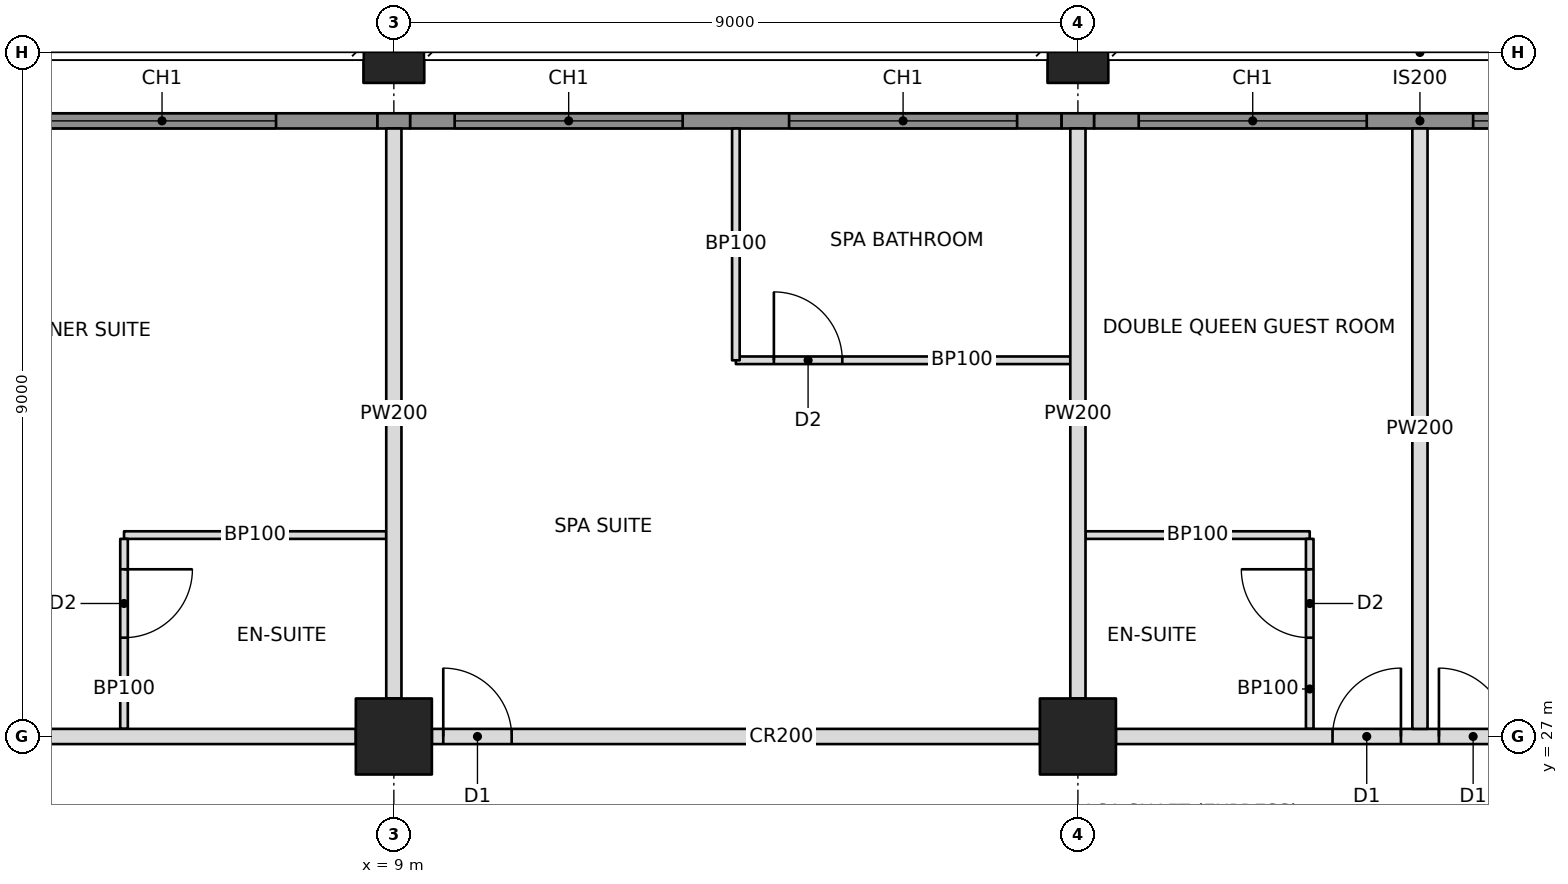
"""IFC4 building model, lengths in metres.
Left out: names, types, materials, properties, quantities, classifications, styles, units other than length and angle.
Written with IfcOpenShell. Run it as: python <this file> out.ifc"""

import sys

from ifc_helpers import new_model, si_unit, direction, frame, frame_2d, origin, origin_2d, place, context, subcontext, project, spatial, rectangle, hollow_rectangle, extrude, element, fill, save


model = new_model("IFC4")
c1 = context("Model", 3, precision=1e-05, world=origin(), true_north=direction((0.0, 1.0)))
c2 = subcontext(c1, "Body", "Model", "MODEL_VIEW")
j1 = project(units=[si_unit("LENGTHUNIT", "METRE"), si_unit("PLANEANGLEUNIT", "RADIAN")], contexts=[c1])
p1 = place(None, origin())
s1 = spatial("IfcSite", under=j1, at=p1, CompositionType="ELEMENT")
p2 = place(p1, origin())
s2 = spatial("IfcBuilding", under=s1, at=p2, CompositionType="ELEMENT")
p3 = place(p2, frame((0.0, 0.0, 152.0)))
s3 = spatial("IfcBuildingStorey", under=s2, at=p3, CompositionType="ELEMENT", Elevation=152.0)
p4 = place(p3, frame((9.0, 27.0, 0.0), z_axis=(0.0, 0.0, 1.0), x_axis=(1.0, 0.0, 0.0)))
e1 = element("IfcColumn", 1, at=p4, inside=s3, PredefinedType="COLUMN", context=c2, shape_type="SweptSolid", body=[
    extrude(hollow_rectangle(XDim=1.0, YDim=1.0, WallThickness=0.1, at=origin_2d()), origin(), (0.0, 0.0, 1.0), 3.4),
])
p5 = place(p3, frame((9.0, 36.0, 0.0), z_axis=(0.0, 0.0, 1.0), x_axis=(1.0, 0.0, 0.0)))
e2 = element("IfcColumn", 2, at=p5, inside=s3, PredefinedType="COLUMN", context=c2, shape_type="SweptSolid", body=[
    extrude(hollow_rectangle(XDim=0.8, YDim=0.8, WallThickness=0.06, at=origin_2d()), origin(), (0.0, 0.0, 1.0), 3.4),
])
p6 = place(p3, frame((18.0, 27.0, 0.0), z_axis=(0.0, 0.0, 1.0), x_axis=(1.0, 0.0, 0.0)))
e3 = element("IfcColumn", 3, at=p6, inside=s3, PredefinedType="COLUMN", context=c2, shape_type="SweptSolid", body=[
    extrude(hollow_rectangle(XDim=1.0, YDim=1.0, WallThickness=0.1, at=origin_2d()), origin(), (0.0, 0.0, 1.0), 3.4),
])
p7 = place(p3, frame((18.0, 36.0, 0.0), z_axis=(0.0, 0.0, 1.0), x_axis=(1.0, 0.0, 0.0)))
e4 = element("IfcColumn", 4, at=p7, inside=s3, PredefinedType="COLUMN", context=c2, shape_type="SweptSolid", body=[
    extrude(hollow_rectangle(XDim=0.8, YDim=0.8, WallThickness=0.06, at=origin_2d()), origin(), (0.0, 0.0, 1.0), 3.4),
])
p8 = place(p3, frame((3.0, 35.1, 0.0), z_axis=(0.0, 0.0, 1.0), x_axis=(1.0, 0.0, 0.0)))
e5 = element("IfcWall", 5, at=p8, inside=s3, PredefinedType="SOLIDWALL", context=c2, shape_type="SweptSolid", body=[
    extrude(rectangle(XDim=5.785, YDim=0.2, at=frame_2d((2.892, 0.0))), origin(), (0.0, 0.0, 1.0), 3.15),
])
p9 = place(p8, frame((1.45, 0.0, 0.6)))
e6 = element("IfcOpeningElement", 6, at=p9, cuts=e5, PredefinedType="OPENING", context=c2, shape_type="SweptSolid", body=[
    extrude(rectangle(XDim=3.0, YDim=2.2, at=frame_2d((1.5, 1.1))), frame((0.0, 0.11, 0.0), z_axis=(0.0, -1.0, 0.0), x_axis=(1.0, 0.0, 0.0)), (0.0, 0.0, 1.0), 0.22),
])
p10 = place(p3, frame((1.0, 27.0, 0.0), z_axis=(0.0, 0.0, 1.0), x_axis=(1.0, 0.0, 0.0)))
e7 = element("IfcWall", 7, at=p10, inside=s3, PredefinedType="PARTITIONING", context=c2, shape_type="SweptSolid", body=[
    extrude(rectangle(XDim=7.5, YDim=0.2, at=frame_2d((3.75, 0.0))), origin(), (0.0, 0.0, 1.0), 2.21),
])
p11 = place(p10, frame((0.25, 0.0, 0.0)))
e8 = element("IfcOpeningElement", 8, at=p11, cuts=e7, PredefinedType="OPENING", context=c2, shape_type="SweptSolid", body=[
    extrude(rectangle(XDim=0.9, YDim=2.1, at=frame_2d((0.45, 1.05))), frame((0.0, 0.11, 0.0), z_axis=(0.0, -1.0, 0.0), x_axis=(1.0, 0.0, 0.0)), (0.0, 0.0, 1.0), 0.22),
])
p12 = place(p3, frame((9.5, 27.0, 0.0), z_axis=(0.0, 0.0, 1.0), x_axis=(1.0, 0.0, 0.0)))
e9 = element("IfcWall", 9, at=p12, inside=s3, PredefinedType="PARTITIONING", context=c2, shape_type="SweptSolid", body=[
    extrude(rectangle(XDim=8.0, YDim=0.2, at=frame_2d((4.0, 0.0))), origin(), (0.0, 0.0, 1.0), 2.21),
])
p13 = place(p12, frame((0.15, 0.0, 0.0)))
e10 = element("IfcOpeningElement", 10, at=p13, cuts=e9, PredefinedType="OPENING", context=c2, shape_type="SweptSolid", body=[
    extrude(rectangle(XDim=0.9, YDim=2.1, at=frame_2d((0.45, 1.05))), frame((0.0, 0.11, 0.0), z_axis=(0.0, -1.0, 0.0), x_axis=(1.0, 0.0, 0.0)), (0.0, 0.0, 1.0), 0.22),
])
p14 = place(p3, frame((18.5, 27.0, 0.0), z_axis=(0.0, 0.0, 1.0), x_axis=(1.0, 0.0, 0.0)))
e11 = element("IfcWall", 11, at=p14, inside=s3, PredefinedType="PARTITIONING", context=c2, shape_type="SweptSolid", body=[
    extrude(rectangle(XDim=8.0, YDim=0.2, at=frame_2d((4.0, 0.0))), origin(), (0.0, 0.0, 1.0), 2.21),
])
p15 = place(p14, frame((2.85, 0.0, 0.0)))
e12 = element("IfcOpeningElement", 12, at=p15, cuts=e11, PredefinedType="OPENING", context=c2, shape_type="SweptSolid", body=[
    extrude(rectangle(XDim=0.9, YDim=2.1, at=frame_2d((0.45, 1.05))), frame((0.0, 0.11, 0.0), z_axis=(0.0, -1.0, 0.0), x_axis=(1.0, 0.0, 0.0)), (0.0, 0.0, 1.0), 0.22),
])
p16 = place(p14, frame((4.25, 0.0, 0.0)))
e13 = element("IfcOpeningElement", 13, at=p16, cuts=e11, PredefinedType="OPENING", context=c2, shape_type="SweptSolid", body=[
    extrude(rectangle(XDim=0.9, YDim=2.1, at=frame_2d((0.45, 1.05))), frame((0.0, 0.11, 0.0), z_axis=(0.0, -1.0, 0.0), x_axis=(1.0, 0.0, 0.0)), (0.0, 0.0, 1.0), 0.22),
])
p17 = place(p3, frame((9.0, 27.5, 0.0), z_axis=(0.0, 0.0, 1.0), x_axis=(0.0, 1.0, 0.0)))
e14 = element("IfcWall", 14, at=p17, inside=s3, PredefinedType="PARTITIONING", context=c2, shape_type="SweptSolid", body=[
    extrude(rectangle(XDim=7.5, YDim=0.2, at=frame_2d((3.75, 0.0))), origin(), (0.0, 0.0, 1.0), 2.21),
])
p18 = place(p3, frame((18.0, 27.5, 0.0), z_axis=(0.0, 0.0, 1.0), x_axis=(0.0, 1.0, 0.0)))
e15 = element("IfcWall", 15, at=p18, inside=s3, PredefinedType="PARTITIONING", context=c2, shape_type="SweptSolid", body=[
    extrude(rectangle(XDim=7.5, YDim=0.2, at=frame_2d((3.75, 0.0))), origin(), (0.0, 0.0, 1.0), 2.203),
])
p19 = place(p3, frame((22.5, 27.1, 0.0), z_axis=(0.0, 0.0, 1.0), x_axis=(0.0, 1.0, 0.0)))
e16 = element("IfcWall", 16, at=p19, inside=s3, PredefinedType="PARTITIONING", context=c2, shape_type="SweptSolid", body=[
    extrude(rectangle(XDim=7.9, YDim=0.2, at=frame_2d((3.95, 0.0))), origin(), (0.0, 0.0, 1.0), 2.21),
])
p20 = place(p3, frame((5.45, 29.65, 0.0), z_axis=(0.0, 0.0, 1.0), x_axis=(1.0, 0.0, 0.0)))
e17 = element("IfcWall", 17, at=p20, inside=s3, PredefinedType="PARTITIONING", context=c2, shape_type="SweptSolid", body=[
    extrude(rectangle(XDim=3.45, YDim=0.1, at=frame_2d((1.725, 0.0))), origin(), (0.0, 0.0, 1.0), 2.21),
])
p21 = place(p3, frame((5.45, 27.1, 0.0), z_axis=(0.0, 0.0, 1.0), x_axis=(0.0, 1.0, 0.0)))
e18 = element("IfcWall", 18, at=p21, inside=s3, PredefinedType="PARTITIONING", context=c2, shape_type="SweptSolid", body=[
    extrude(rectangle(XDim=2.5, YDim=0.1, at=frame_2d((1.25, 0.0))), origin(), (0.0, 0.0, 1.0), 2.21),
])
p22 = place(p21, frame((1.2, 0.0, 0.0)))
e19 = element("IfcOpeningElement", 19, at=p22, cuts=e18, PredefinedType="OPENING", context=c2, shape_type="SweptSolid", body=[
    extrude(rectangle(XDim=0.9, YDim=2.1, at=frame_2d((0.45, 1.05))), frame((0.0, 0.06, 0.0), z_axis=(0.0, -1.0, 0.0), x_axis=(1.0, 0.0, 0.0)), (0.0, 0.0, 1.0), 0.12),
])
p23 = place(p3, frame((13.5, 31.95, 0.0), z_axis=(0.0, 0.0, 1.0), x_axis=(1.0, 0.0, 0.0)))
e20 = element("IfcWall", 20, at=p23, inside=s3, PredefinedType="PARTITIONING", context=c2, shape_type="SweptSolid", body=[
    extrude(rectangle(XDim=4.4, YDim=0.1, at=frame_2d((2.2, 0.0))), origin(), (0.0, 0.0, 1.0), 2.202),
])
p24 = place(p23, frame((0.5, 0.0, 0.0)))
e21 = element("IfcOpeningElement", 21, at=p24, cuts=e20, PredefinedType="OPENING", context=c2, shape_type="SweptSolid", body=[
    extrude(rectangle(XDim=0.9, YDim=2.1, at=frame_2d((0.45, 1.05))), frame((0.0, 0.06, 0.0), z_axis=(0.0, -1.0, 0.0), x_axis=(1.0, 0.0, 0.0)), (0.0, 0.0, 1.0), 0.12),
])
p25 = place(p3, frame((13.5, 31.95, 0.0), z_axis=(0.0, 0.0, 1.0), x_axis=(0.0, 1.0, 0.0)))
e22 = element("IfcWall", 22, at=p25, inside=s3, PredefinedType="PARTITIONING", context=c2, shape_type="SweptSolid", body=[
    extrude(rectangle(XDim=3.05, YDim=0.1, at=frame_2d((1.525, 0.0))), origin(), (0.0, 0.0, 1.0), 2.542),
])
p26 = place(p3, frame((18.1, 29.65, 0.0), z_axis=(0.0, 0.0, 1.0), x_axis=(1.0, 0.0, 0.0)))
e23 = element("IfcWall", 23, at=p26, inside=s3, PredefinedType="PARTITIONING", context=c2, shape_type="SweptSolid", body=[
    extrude(rectangle(XDim=2.95, YDim=0.1, at=frame_2d((1.475, 0.0))), origin(), (0.0, 0.0, 1.0), 2.202),
])
p27 = place(p3, frame((21.05, 27.1, 0.0), z_axis=(0.0, 0.0, 1.0), x_axis=(0.0, 1.0, 0.0)))
e24 = element("IfcWall", 24, at=p27, inside=s3, PredefinedType="PARTITIONING", context=c2, shape_type="SweptSolid", body=[
    extrude(rectangle(XDim=2.5, YDim=0.1, at=frame_2d((1.25, 0.0))), origin(), (0.0, 0.0, 1.0), 2.21),
])
p28 = place(p27, frame((1.2, 0.0, 0.0)))
e25 = element("IfcOpeningElement", 25, at=p28, cuts=e24, PredefinedType="OPENING", context=c2, shape_type="SweptSolid", body=[
    extrude(rectangle(XDim=0.9, YDim=2.1, at=frame_2d((0.45, 1.05))), frame((0.0, 0.06, 0.0), z_axis=(0.0, -1.0, 0.0), x_axis=(1.0, 0.0, 0.0)), (0.0, 0.0, 1.0), 0.12),
])
p29 = place(p3, frame((8.785, 35.1, 0.0), z_axis=(0.0, 0.0, 1.0), x_axis=(1.0, 0.0, 0.0)))
e26 = element("IfcWall", 26, at=p29, inside=s3, PredefinedType="SOLIDWALL", context=c2, shape_type="SweptSolid", body=[
    extrude(rectangle(XDim=0.431, YDim=0.2, at=frame_2d((0.215, 0.0))), origin(), (0.0, 0.0, 1.0), 2.21),
])
p30 = place(p3, frame((9.215, 35.1, 0.0), z_axis=(0.0, 0.0, 1.0), x_axis=(1.0, 0.0, 0.0)))
e27 = element("IfcWall", 27, at=p30, inside=s3, PredefinedType="SOLIDWALL", context=c2, shape_type="SweptSolid", body=[
    extrude(rectangle(XDim=8.571, YDim=0.2, at=frame_2d((4.285, 0.0))), origin(), (0.0, 0.0, 1.0), 3.15),
])
p31 = place(p30, frame((0.585, 0.0, 0.6)))
e28 = element("IfcOpeningElement", 28, at=p31, cuts=e27, PredefinedType="OPENING", context=c2, shape_type="SweptSolid", body=[
    extrude(rectangle(XDim=3.0, YDim=2.2, at=frame_2d((1.5, 1.1))), frame((0.0, 0.11, 0.0), z_axis=(0.0, -1.0, 0.0), x_axis=(1.0, 0.0, 0.0)), (0.0, 0.0, 1.0), 0.22),
])
p32 = place(p30, frame((4.985, 0.0, 0.6)))
e29 = element("IfcOpeningElement", 29, at=p32, cuts=e27, PredefinedType="OPENING", context=c2, shape_type="SweptSolid", body=[
    extrude(rectangle(XDim=3.0, YDim=2.2, at=frame_2d((1.5, 1.1))), frame((0.0, 0.11, 0.0), z_axis=(0.0, -1.0, 0.0), x_axis=(1.0, 0.0, 0.0)), (0.0, 0.0, 1.0), 0.22),
])
p33 = place(p3, frame((17.786, 35.1, 0.0), z_axis=(0.0, 0.0, 1.0), x_axis=(1.0, 0.0, 0.0)))
e30 = element("IfcWall", 30, at=p33, inside=s3, PredefinedType="SOLIDWALL", context=c2, shape_type="SweptSolid", body=[
    extrude(rectangle(XDim=0.428, YDim=0.2, at=frame_2d((0.214, 0.0))), origin(), (0.0, 0.0, 1.0), 2.202),
])
p34 = place(p3, frame((18.214, 35.1, 0.0), z_axis=(0.0, 0.0, 1.0), x_axis=(1.0, 0.0, 0.0)))
e31 = element("IfcWall", 31, at=p34, inside=s3, PredefinedType="SOLIDWALL", context=c2, shape_type="SweptSolid", body=[
    extrude(rectangle(XDim=8.572, YDim=0.2, at=frame_2d((4.286, 0.0))), origin(), (0.0, 0.0, 1.0), 3.15),
])
p35 = place(p34, frame((0.586, 0.0, 0.6)))
e32 = element("IfcOpeningElement", 32, at=p35, cuts=e31, PredefinedType="OPENING", context=c2, shape_type="SweptSolid", body=[
    extrude(rectangle(XDim=3.0, YDim=2.2, at=frame_2d((1.5, 1.1))), frame((0.0, 0.11, 0.0), z_axis=(0.0, -1.0, 0.0), x_axis=(1.0, 0.0, 0.0)), (0.0, 0.0, 1.0), 0.22),
])
p36 = place(p34, frame((4.986, 0.0, 0.6)))
e33 = element("IfcOpeningElement", 33, at=p36, cuts=e31, PredefinedType="OPENING", context=c2, shape_type="SweptSolid", body=[
    extrude(rectangle(XDim=3.0, YDim=2.2, at=frame_2d((1.5, 1.1))), frame((0.0, 0.11, 0.0), z_axis=(0.0, -1.0, 0.0), x_axis=(1.0, 0.0, 0.0)), (0.0, 0.0, 1.0), 0.22),
])
p37 = place(p9, origin())
e34 = element("IfcWindow", 34, at=p37, inside=s3, PartitioningType="TRIPLE_PANEL_VERTICAL", PredefinedType="WINDOW", context=c2, shape_type="SweptSolid", body=[
    extrude(rectangle(XDim=3.0, YDim=2.2, at=frame_2d((1.5, 1.1))), frame((0.0, 0.03, 0.0), z_axis=(0.0, -1.0, 0.0), x_axis=(1.0, 0.0, 0.0)), (0.0, 0.0, 1.0), 0.06),
])
fill(e6, e34)
p38 = place(p31, origin())
e35 = element("IfcWindow", 35, at=p38, inside=s3, PartitioningType="TRIPLE_PANEL_VERTICAL", PredefinedType="WINDOW", context=c2, shape_type="SweptSolid", body=[
    extrude(rectangle(XDim=3.0, YDim=2.2, at=frame_2d((1.5, 1.1))), frame((0.0, 0.03, 0.0), z_axis=(0.0, -1.0, 0.0), x_axis=(1.0, 0.0, 0.0)), (0.0, 0.0, 1.0), 0.06),
])
fill(e28, e35)
p39 = place(p32, origin())
e36 = element("IfcWindow", 36, at=p39, inside=s3, PartitioningType="TRIPLE_PANEL_VERTICAL", PredefinedType="WINDOW", context=c2, shape_type="SweptSolid", body=[
    extrude(rectangle(XDim=3.0, YDim=2.2, at=frame_2d((1.5, 1.1))), frame((0.0, 0.03, 0.0), z_axis=(0.0, -1.0, 0.0), x_axis=(1.0, 0.0, 0.0)), (0.0, 0.0, 1.0), 0.06),
])
fill(e29, e36)
p40 = place(p35, origin())
e37 = element("IfcWindow", 37, at=p40, inside=s3, PartitioningType="TRIPLE_PANEL_VERTICAL", PredefinedType="WINDOW", context=c2, shape_type="SweptSolid", body=[
    extrude(rectangle(XDim=3.0, YDim=2.2, at=frame_2d((1.5, 1.1))), frame((0.0, 0.03, 0.0), z_axis=(0.0, -1.0, 0.0), x_axis=(1.0, 0.0, 0.0)), (0.0, 0.0, 1.0), 0.06),
])
fill(e32, e37)
p41 = place(p36, origin())
e38 = element("IfcWindow", 38, at=p41, inside=s3, PartitioningType="TRIPLE_PANEL_VERTICAL", PredefinedType="WINDOW", context=c2, shape_type="SweptSolid", body=[
    extrude(rectangle(XDim=3.0, YDim=2.2, at=frame_2d((1.5, 1.1))), frame((0.0, 0.03, 0.0), z_axis=(0.0, -1.0, 0.0), x_axis=(1.0, 0.0, 0.0)), (0.0, 0.0, 1.0), 0.06),
])
fill(e33, e38)
p42 = place(p22, frame((0.9, 0.0, 0.0), z_axis=(0.0, 0.0, 1.0), x_axis=(-1.0, 0.0, 0.0)))
e39 = element("IfcDoor", 39, at=p42, inside=s3, OperationType="SINGLE_SWING_LEFT", PredefinedType="DOOR", context=c2, shape_type="SweptSolid", body=[
    extrude(rectangle(XDim=0.9, YDim=2.1, at=frame_2d((0.45, 1.05))), frame((0.0, 0.025, 0.0), z_axis=(0.0, -1.0, 0.0), x_axis=(1.0, 0.0, 0.0)), (0.0, 0.0, 1.0), 0.05),
])
fill(e19, e39)
p43 = place(p24, origin())
e40 = element("IfcDoor", 40, at=p43, inside=s3, OperationType="SINGLE_SWING_LEFT", PredefinedType="DOOR", context=c2, shape_type="SweptSolid", body=[
    extrude(rectangle(XDim=0.9, YDim=2.1, at=frame_2d((0.45, 1.05))), frame((0.0, 0.025, 0.0), z_axis=(0.0, -1.0, 0.0), x_axis=(1.0, 0.0, 0.0)), (0.0, 0.0, 1.0), 0.05),
])
fill(e21, e40)
p44 = place(p13, origin())
e41 = element("IfcDoor", 41, at=p44, inside=s3, OperationType="SINGLE_SWING_LEFT", PredefinedType="DOOR", context=c2, shape_type="SweptSolid", body=[
    extrude(rectangle(XDim=0.9, YDim=2.1, at=frame_2d((0.45, 1.05))), frame((0.0, 0.025, 0.0), z_axis=(0.0, -1.0, 0.0), x_axis=(1.0, 0.0, 0.0)), (0.0, 0.0, 1.0), 0.05),
])
fill(e10, e41)
p45 = place(p28, origin())
e42 = element("IfcDoor", 42, at=p45, inside=s3, OperationType="SINGLE_SWING_RIGHT", PredefinedType="DOOR", context=c2, shape_type="SweptSolid", body=[
    extrude(rectangle(XDim=0.9, YDim=2.1, at=frame_2d((0.45, 1.05))), frame((0.0, 0.025, 0.0), z_axis=(0.0, -1.0, 0.0), x_axis=(1.0, 0.0, 0.0)), (0.0, 0.0, 1.0), 0.05),
])
fill(e25, e42)
p46 = place(p15, origin())
e43 = element("IfcDoor", 43, at=p46, inside=s3, OperationType="SINGLE_SWING_RIGHT", PredefinedType="DOOR", context=c2, shape_type="SweptSolid", body=[
    extrude(rectangle(XDim=0.9, YDim=2.1, at=frame_2d((0.45, 1.05))), frame((0.0, 0.025, 0.0), z_axis=(0.0, -1.0, 0.0), x_axis=(1.0, 0.0, 0.0)), (0.0, 0.0, 1.0), 0.05),
])
fill(e12, e43)
p47 = place(p16, origin())
e44 = element("IfcDoor", 44, at=p47, inside=s3, OperationType="SINGLE_SWING_LEFT", PredefinedType="DOOR", context=c2, shape_type="SweptSolid", body=[
    extrude(rectangle(XDim=0.9, YDim=2.1, at=frame_2d((0.45, 1.05))), frame((0.0, 0.025, 0.0), z_axis=(0.0, -1.0, 0.0), x_axis=(1.0, 0.0, 0.0)), (0.0, 0.0, 1.0), 0.05),
])
fill(e13, e44)
save(model, sys.argv[1])
